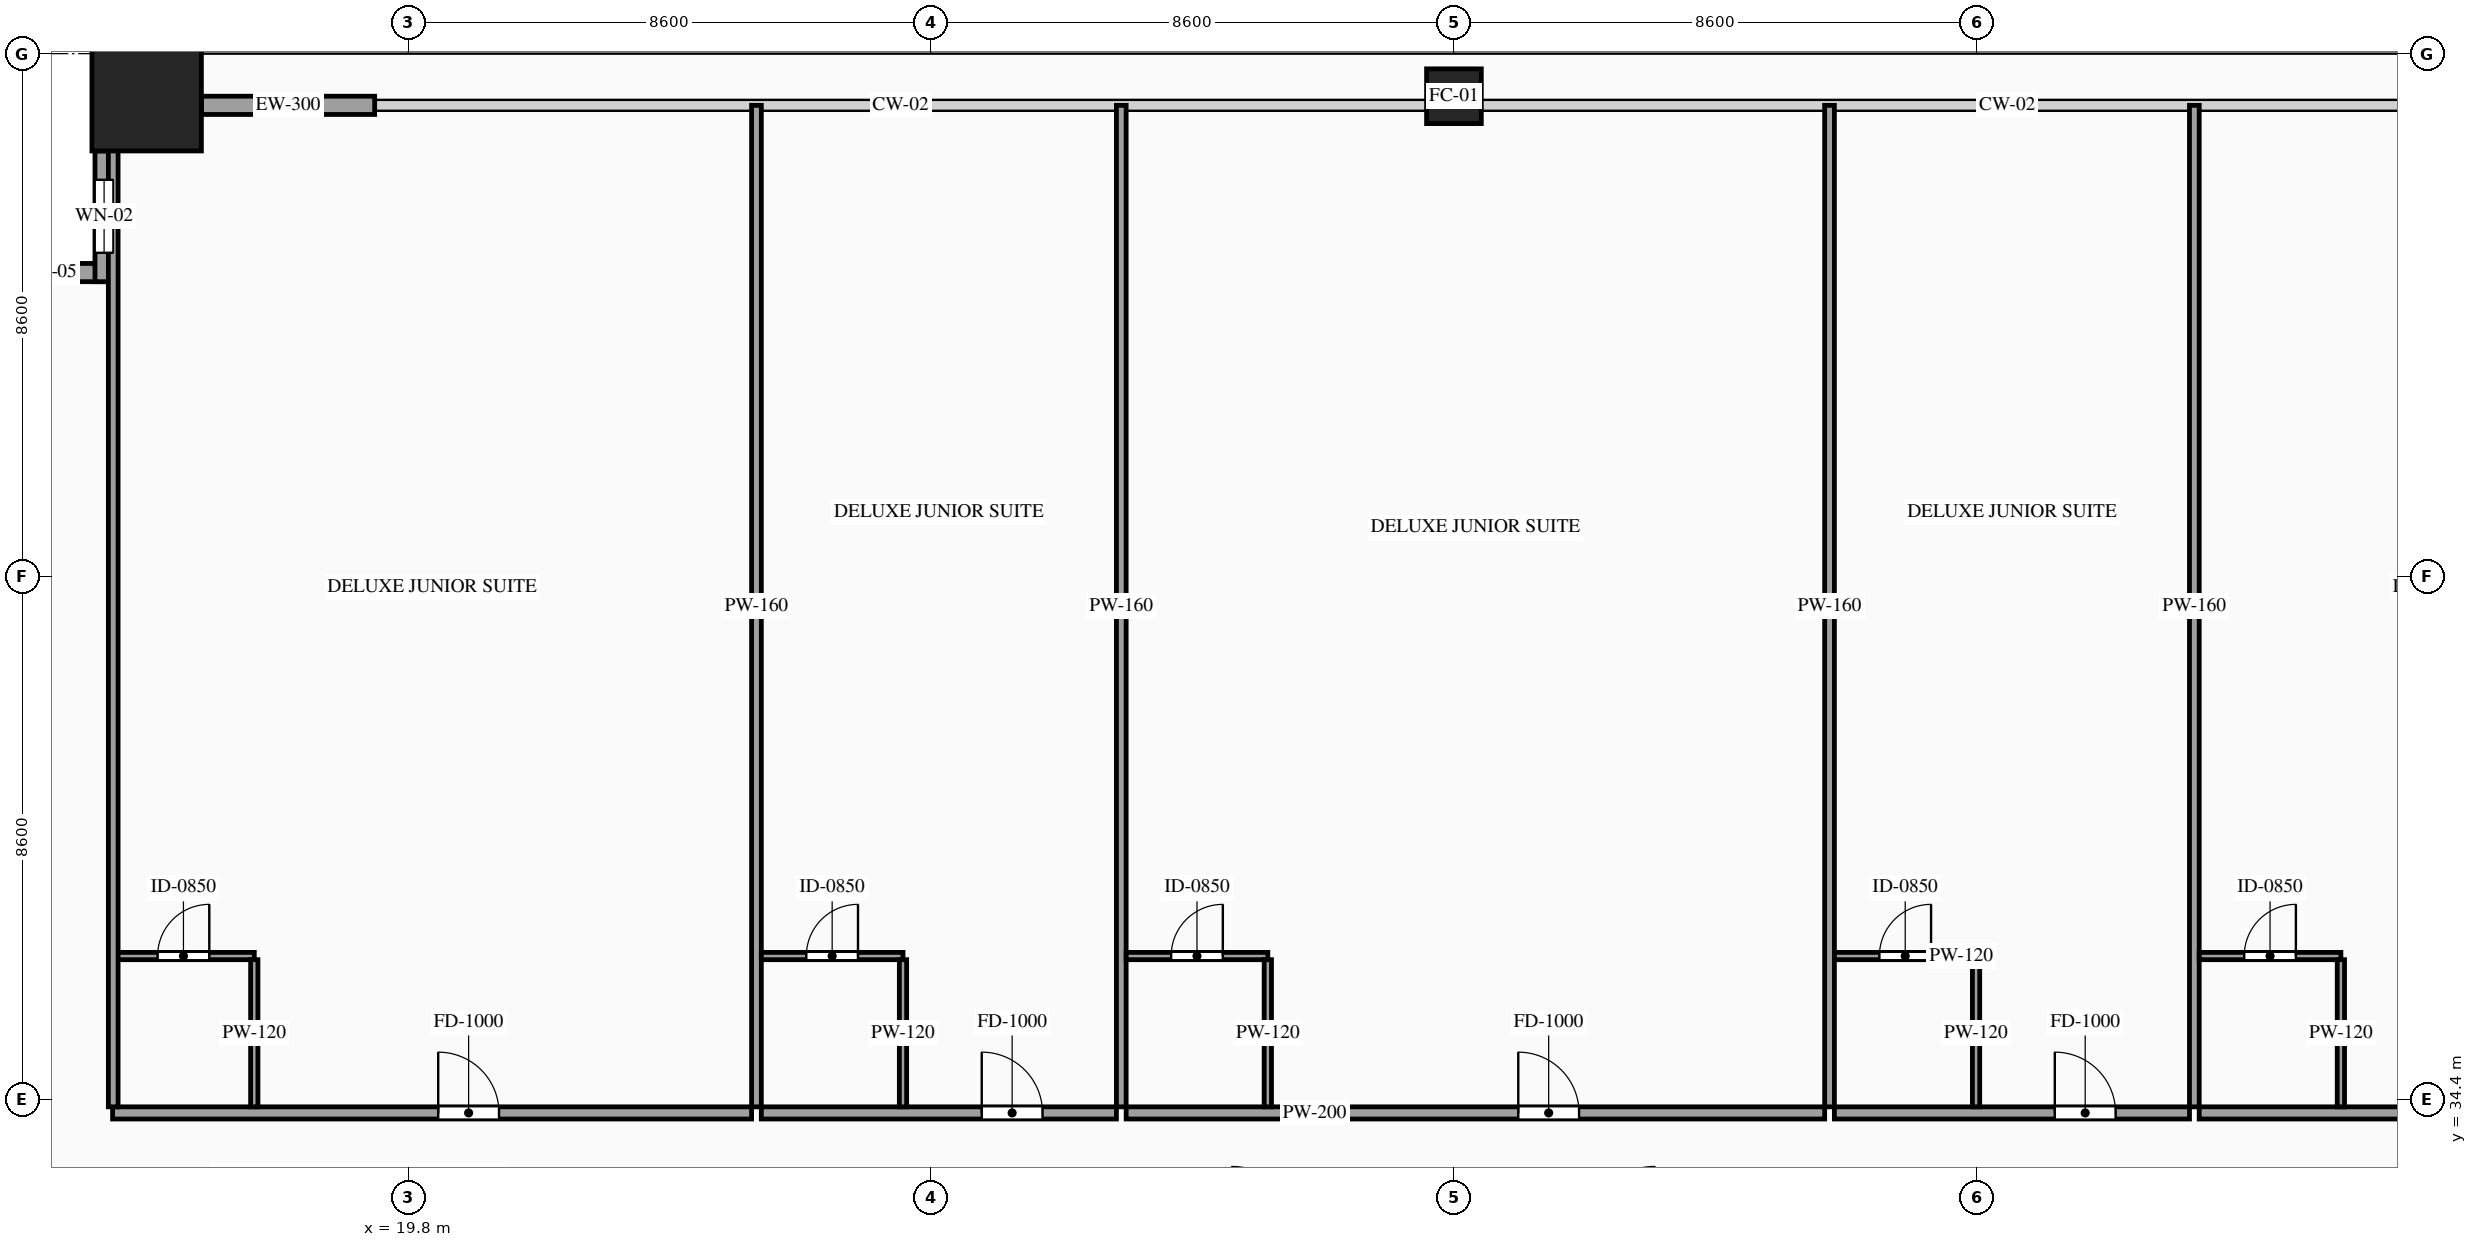
"""IFC4 building model, lengths in metres.
Left out: names, types, materials, properties, quantities, classifications, styles, units other than length and angle.
Written with IfcOpenShell. Run it as: python <this file> out.ifc"""

import sys

from ifc_helpers import new_model, si_unit, direction, frame, frame_2d, origin, origin_2d, place, context, subcontext, project, spatial, rectangle, hollow_rectangle, extrude, source, transform, mapped, element, fill, save


model = new_model("IFC4")
c1 = context("Model", 3, precision=1e-05, world=origin(), true_north=direction((0.0, 1.0)))
c2 = subcontext(c1, "Body", "Model", "MODEL_VIEW")
j1 = project(units=[si_unit("LENGTHUNIT", "METRE"), si_unit("PLANEANGLEUNIT", "RADIAN")], contexts=[c1])
p1 = place(None, origin())
s1 = spatial("IfcSite", under=j1, at=p1, CompositionType="ELEMENT")
p2 = place(p1, origin())
s2 = spatial("IfcBuilding", under=s1, at=p2, CompositionType="ELEMENT")
p3 = place(p2, frame((0.0, 0.0, 82.0)))
s3 = spatial("IfcBuildingStorey", under=s2, at=p3, CompositionType="ELEMENT", Elevation=82.0)
m1 = source(origin(), c2, "Body", "SweptSolid", [
    extrude(hollow_rectangle(XDim=1.8, YDim=1.8, WallThickness=0.08, at=origin_2d()), origin(), (0.0, 0.0, 1.0), 3.32),
])
p4 = place(p3, frame((15.5, 50.9, 0.0), z_axis=(0.0, 0.0, 1.0), x_axis=(1.0, 0.0, 0.0)))
e1 = element("IfcColumn", 1, at=p4, inside=s3, PredefinedType="COLUMN", context=c2, shape_type="MappedRepresentation", body=[
    mapped(m1, transform((0.0, 0.0, 0.0), scale=1.0)),
])
m2 = source(origin(), c2, "Body", "SweptSolid", [
    extrude(hollow_rectangle(XDim=0.9, YDim=0.9, WallThickness=0.042, at=origin_2d()), origin(), (0.0, 0.0, 1.0), 3.32),
])
p5 = place(p3, frame((37.0, 50.9, 0.0), z_axis=(0.0, 0.0, 1.0), x_axis=(1.0, 0.0, 0.0)))
e2 = element("IfcColumn", 2, at=p5, inside=s3, PredefinedType="COLUMN", context=c2, shape_type="MappedRepresentation", body=[
    mapped(m2, transform((0.0, 0.0, 0.0), scale=1.0)),
])
p6 = place(p3, frame((14.95, 48.0, 0.0), z_axis=(0.0, 0.0, 1.0), x_axis=(-1.0, 0.0, 0.0)))
e3 = element("IfcWall", 3, at=p6, inside=s3, PredefinedType="SOLIDWALL", context=c2, shape_type="SweptSolid", body=[
    extrude(rectangle(XDim=2.15, YDim=0.3, at=frame_2d((1.075, 0.0))), origin(), (0.0, 0.0, 1.0), 3.32),
])
p7 = place(p6, frame((0.625, 0.0, 0.85)))
e4 = element("IfcOpeningElement", 4, at=p7, cuts=e3, PredefinedType="OPENING", context=c2, shape_type="SweptSolid", body=[
    extrude(rectangle(XDim=0.9, YDim=1.5, at=frame_2d((0.45, 0.75))), frame((0.0, 0.165, 0.0), z_axis=(0.0, -1.0, 0.0), x_axis=(1.0, 0.0, 0.0)), (0.0, 0.0, 1.0), 0.33),
])
p8 = place(p3, frame((14.8, 50.0, 0.0), z_axis=(0.0, 0.0, 1.0), x_axis=(0.0, -1.0, 0.0)))
e5 = element("IfcWall", 5, at=p8, inside=s3, PredefinedType="SOLIDWALL", context=c2, shape_type="SweptSolid", body=[
    extrude(rectangle(XDim=2.15, YDim=0.3, at=frame_2d((1.075, 0.0))), origin(), (0.0, 0.0, 1.0), 3.32),
])
p9 = place(p8, frame((0.475, 0.0, 0.85)))
e6 = element("IfcOpeningElement", 6, at=p9, cuts=e5, PredefinedType="OPENING", context=c2, shape_type="SweptSolid", body=[
    extrude(rectangle(XDim=1.2, YDim=2.1, at=frame_2d((0.6, 1.05))), frame((0.0, 0.165, 0.0), z_axis=(0.0, -1.0, 0.0), x_axis=(1.0, 0.0, 0.0)), (0.0, 0.0, 1.0), 0.33),
])
m3 = source(origin(), c2, "Body", "SweptSolid", [
    extrude(rectangle(XDim=2.85, YDim=0.3, at=frame_2d((1.425, 0.0))), origin(), (0.0, 0.0, 1.0), 2.715),
])
p10 = place(p3, frame((16.4, 50.75, 0.0), z_axis=(0.0, 0.0, 1.0), x_axis=(1.0, 0.0, 0.0)))
e7 = element("IfcWall", 7, at=p10, inside=s3, PredefinedType="SOLIDWALL", context=c2, shape_type="MappedRepresentation", body=[
    mapped(m3, transform((0.0, 0.0, 0.0), scale=1.0)),
])
p11 = place(p3, frame((14.94, 34.18, 0.0), z_axis=(0.0, 0.0, 1.0), x_axis=(1.0, 0.0, 0.0)))
e8 = element("IfcWall", 8, at=p11, inside=s3, PredefinedType="PARTITIONING", context=c2, shape_type="SweptSolid", body=[
    extrude(rectangle(XDim=10.509, YDim=0.2, at=frame_2d((5.254, 0.0))), origin(), (0.0, 0.0, 1.0), 3.32),
])
p12 = place(p11, frame((5.355, 0.0, 0.0)))
e9 = element("IfcOpeningElement", 9, at=p12, cuts=e8, PredefinedType="OPENING", context=c2, shape_type="SweptSolid", body=[
    extrude(rectangle(XDim=1.0, YDim=2.2, at=frame_2d((0.5, 1.1))), frame((0.0, 0.115, 0.0), z_axis=(0.0, -1.0, 0.0), x_axis=(1.0, 0.0, 0.0)), (0.0, 0.0, 1.0), 0.23),
])
m4 = source(origin(), c2, "Body", "SweptSolid", [
    extrude(rectangle(XDim=16.47, YDim=0.16, at=frame_2d((8.235, 0.0))), origin(), (0.0, 0.0, 1.0), 3.32),
])
p13 = place(p3, frame((25.529, 34.28, 0.0), z_axis=(0.0, 0.0, 1.0), x_axis=(0.0, 1.0, 0.0)))
e10 = element("IfcWall", 10, at=p13, inside=s3, PredefinedType="PARTITIONING", context=c2, shape_type="MappedRepresentation", body=[
    mapped(m4, transform((0.0, 0.0, 0.0), scale=1.0)),
])
p14 = place(p3, frame((14.94, 36.76, 0.0), z_axis=(0.0, 0.0, 1.0), x_axis=(1.0, 0.0, 0.0)))
e11 = element("IfcWall", 11, at=p14, inside=s3, PredefinedType="PARTITIONING", context=c2, shape_type="SweptSolid", body=[
    extrude(rectangle(XDim=2.33, YDim=0.12, at=frame_2d((1.165, 0.0))), origin(), (0.0, 0.0, 1.0), 3.32),
])
p15 = place(p14, frame((0.74, 0.0, 0.0)))
e12 = element("IfcOpeningElement", 12, at=p15, cuts=e11, PredefinedType="OPENING", context=c2, shape_type="SweptSolid", body=[
    extrude(rectangle(XDim=0.85, YDim=2.1, at=frame_2d((0.425, 1.05))), frame((0.0, 0.075, 0.0), z_axis=(0.0, -1.0, 0.0), x_axis=(1.0, 0.0, 0.0)), (0.0, 0.0, 1.0), 0.15),
])
m5 = source(origin(), c2, "Body", "SweptSolid", [
    extrude(rectangle(XDim=2.42, YDim=0.12, at=frame_2d((1.21, 0.0))), origin(), (0.0, 0.0, 1.0), 3.32),
])
p16 = place(p3, frame((17.27, 34.28, 0.0), z_axis=(0.0, 0.0, 1.0), x_axis=(0.0, 1.0, 0.0)))
e13 = element("IfcWall", 13, at=p16, inside=s3, PredefinedType="PARTITIONING", context=c2, shape_type="MappedRepresentation", body=[
    mapped(m5, transform((0.0, 0.0, 0.0), scale=1.0)),
])
p17 = place(p3, frame((25.609, 34.18, 0.0), z_axis=(0.0, 0.0, 1.0), x_axis=(1.0, 0.0, 0.0)))
e14 = element("IfcWall", 14, at=p17, inside=s3, PredefinedType="PARTITIONING", context=c2, shape_type="SweptSolid", body=[
    extrude(rectangle(XDim=5.84, YDim=0.2, at=frame_2d((2.92, 0.0))), origin(), (0.0, 0.0, 1.0), 3.32),
])
p18 = place(p17, frame((3.625, 0.0, 0.0)))
e15 = element("IfcOpeningElement", 15, at=p18, cuts=e14, PredefinedType="OPENING", context=c2, shape_type="SweptSolid", body=[
    extrude(rectangle(XDim=1.0, YDim=2.2, at=frame_2d((0.5, 1.1))), frame((0.0, 0.115, 0.0), z_axis=(0.0, -1.0, 0.0), x_axis=(1.0, 0.0, 0.0)), (0.0, 0.0, 1.0), 0.23),
])
p19 = place(p3, frame((31.529, 34.28, 0.0), z_axis=(0.0, 0.0, 1.0), x_axis=(0.0, 1.0, 0.0)))
e16 = element("IfcWall", 16, at=p19, inside=s3, PredefinedType="PARTITIONING", context=c2, shape_type="MappedRepresentation", body=[
    mapped(m4, transform((0.0, 0.0, 0.0), scale=1.0)),
])
p20 = place(p3, frame((25.609, 36.76, 0.0), z_axis=(0.0, 0.0, 1.0), x_axis=(1.0, 0.0, 0.0)))
e17 = element("IfcWall", 17, at=p20, inside=s3, PredefinedType="PARTITIONING", context=c2, shape_type="SweptSolid", body=[
    extrude(rectangle(XDim=2.33, YDim=0.12, at=frame_2d((1.165, 0.0))), origin(), (0.0, 0.0, 1.0), 3.32),
])
p21 = place(p20, frame((0.74, 0.0, 0.0)))
e18 = element("IfcOpeningElement", 18, at=p21, cuts=e17, PredefinedType="OPENING", context=c2, shape_type="SweptSolid", body=[
    extrude(rectangle(XDim=0.85, YDim=2.1, at=frame_2d((0.425, 1.05))), frame((0.0, 0.075, 0.0), z_axis=(0.0, -1.0, 0.0), x_axis=(1.0, 0.0, 0.0)), (0.0, 0.0, 1.0), 0.15),
])
p22 = place(p3, frame((27.939, 34.28, 0.0), z_axis=(0.0, 0.0, 1.0), x_axis=(0.0, 1.0, 0.0)))
e19 = element("IfcWall", 19, at=p22, inside=s3, PredefinedType="PARTITIONING", context=c2, shape_type="MappedRepresentation", body=[
    mapped(m5, transform((0.0, 0.0, 0.0), scale=1.0)),
])
p23 = place(p3, frame((31.609, 34.18, 0.0), z_axis=(0.0, 0.0, 1.0), x_axis=(1.0, 0.0, 0.0)))
e20 = element("IfcWall", 20, at=p23, inside=s3, PredefinedType="PARTITIONING", context=c2, shape_type="SweptSolid", body=[
    extrude(rectangle(XDim=11.488, YDim=0.2, at=frame_2d((5.744, 0.0))), origin(), (0.0, 0.0, 1.0), 3.32),
])
p24 = place(p23, frame((6.449, 0.0, 0.0)))
e21 = element("IfcOpeningElement", 21, at=p24, cuts=e20, PredefinedType="OPENING", context=c2, shape_type="SweptSolid", body=[
    extrude(rectangle(XDim=1.0, YDim=2.2, at=frame_2d((0.5, 1.1))), frame((0.0, 0.115, 0.0), z_axis=(0.0, -1.0, 0.0), x_axis=(1.0, 0.0, 0.0)), (0.0, 0.0, 1.0), 0.23),
])
p25 = place(p3, frame((43.177, 34.28, 0.0), z_axis=(0.0, 0.0, 1.0), x_axis=(0.0, 1.0, 0.0)))
e22 = element("IfcWall", 22, at=p25, inside=s3, PredefinedType="PARTITIONING", context=c2, shape_type="MappedRepresentation", body=[
    mapped(m4, transform((0.0, 0.0, 0.0), scale=1.0)),
])
p26 = place(p3, frame((31.609, 36.76, 0.0), z_axis=(0.0, 0.0, 1.0), x_axis=(1.0, 0.0, 0.0)))
e23 = element("IfcWall", 23, at=p26, inside=s3, PredefinedType="PARTITIONING", context=c2, shape_type="SweptSolid", body=[
    extrude(rectangle(XDim=2.33, YDim=0.12, at=frame_2d((1.165, 0.0))), origin(), (0.0, 0.0, 1.0), 3.32),
])
p27 = place(p26, frame((0.74, 0.0, 0.0)))
e24 = element("IfcOpeningElement", 24, at=p27, cuts=e23, PredefinedType="OPENING", context=c2, shape_type="SweptSolid", body=[
    extrude(rectangle(XDim=0.85, YDim=2.1, at=frame_2d((0.425, 1.05))), frame((0.0, 0.075, 0.0), z_axis=(0.0, -1.0, 0.0), x_axis=(1.0, 0.0, 0.0)), (0.0, 0.0, 1.0), 0.15),
])
p28 = place(p3, frame((33.939, 34.28, 0.0), z_axis=(0.0, 0.0, 1.0), x_axis=(0.0, 1.0, 0.0)))
e25 = element("IfcWall", 25, at=p28, inside=s3, PredefinedType="PARTITIONING", context=c2, shape_type="MappedRepresentation", body=[
    mapped(m5, transform((0.0, 0.0, 0.0), scale=1.0)),
])
p29 = place(p3, frame((43.257, 34.18, 0.0), z_axis=(0.0, 0.0, 1.0), x_axis=(1.0, 0.0, 0.0)))
e26 = element("IfcWall", 26, at=p29, inside=s3, PredefinedType="PARTITIONING", context=c2, shape_type="SweptSolid", body=[
    extrude(rectangle(XDim=5.84, YDim=0.2, at=frame_2d((2.92, 0.0))), origin(), (0.0, 0.0, 1.0), 3.32),
])
p30 = place(p29, frame((3.625, 0.0, 0.0)))
e27 = element("IfcOpeningElement", 27, at=p30, cuts=e26, PredefinedType="OPENING", context=c2, shape_type="SweptSolid", body=[
    extrude(rectangle(XDim=1.0, YDim=2.2, at=frame_2d((0.5, 1.1))), frame((0.0, 0.115, 0.0), z_axis=(0.0, -1.0, 0.0), x_axis=(1.0, 0.0, 0.0)), (0.0, 0.0, 1.0), 0.23),
])
p31 = place(p3, frame((49.177, 34.28, 0.0), z_axis=(0.0, 0.0, 1.0), x_axis=(0.0, 1.0, 0.0)))
e28 = element("IfcWall", 28, at=p31, inside=s3, PredefinedType="PARTITIONING", context=c2, shape_type="MappedRepresentation", body=[
    mapped(m4, transform((0.0, 0.0, 0.0), scale=1.0)),
])
p32 = place(p3, frame((43.257, 36.76, 0.0), z_axis=(0.0, 0.0, 1.0), x_axis=(1.0, 0.0, 0.0)))
e29 = element("IfcWall", 29, at=p32, inside=s3, PredefinedType="PARTITIONING", context=c2, shape_type="SweptSolid", body=[
    extrude(rectangle(XDim=2.33, YDim=0.12, at=frame_2d((1.165, 0.0))), origin(), (0.0, 0.0, 1.0), 3.32),
])
p33 = place(p32, frame((0.74, 0.0, 0.0)))
e30 = element("IfcOpeningElement", 30, at=p33, cuts=e29, PredefinedType="OPENING", context=c2, shape_type="SweptSolid", body=[
    extrude(rectangle(XDim=0.85, YDim=2.1, at=frame_2d((0.425, 1.05))), frame((0.0, 0.075, 0.0), z_axis=(0.0, -1.0, 0.0), x_axis=(1.0, 0.0, 0.0)), (0.0, 0.0, 1.0), 0.15),
])
p34 = place(p3, frame((45.587, 34.28, 0.0), z_axis=(0.0, 0.0, 1.0), x_axis=(0.0, 1.0, 0.0)))
e31 = element("IfcWall", 31, at=p34, inside=s3, PredefinedType="PARTITIONING", context=c2, shape_type="MappedRepresentation", body=[
    mapped(m5, transform((0.0, 0.0, 0.0), scale=1.0)),
])
p35 = place(p3, frame((49.257, 34.18, 0.0), z_axis=(0.0, 0.0, 1.0), x_axis=(1.0, 0.0, 0.0)))
e32 = element("IfcWall", 32, at=p35, inside=s3, PredefinedType="PARTITIONING", context=c2, shape_type="SweptSolid", body=[
    extrude(rectangle(XDim=9.803, YDim=0.2, at=frame_2d((4.901, 0.0))), origin(), (0.0, 0.0, 1.0), 3.32),
])
p36 = place(p35, frame((5.607, 0.0, 0.0)))
e33 = element("IfcOpeningElement", 33, at=p36, cuts=e32, PredefinedType="OPENING", context=c2, shape_type="SweptSolid", body=[
    extrude(rectangle(XDim=1.0, YDim=2.2, at=frame_2d((0.5, 1.1))), frame((0.0, 0.115, 0.0), z_axis=(0.0, -1.0, 0.0), x_axis=(1.0, 0.0, 0.0)), (0.0, 0.0, 1.0), 0.23),
])
m6 = source(origin(), c2, "Body", "SweptSolid", [
    extrude(rectangle(XDim=16.32, YDim=0.16, at=frame_2d((8.16, 0.0))), origin(), (0.0, 0.0, 1.0), 3.32),
])
p37 = place(p3, frame((14.95, 34.28, 0.0), z_axis=(0.0, 0.0, 1.0), x_axis=(0.0, 1.0, 0.0)))
e34 = element("IfcWall", 34, at=p37, inside=s3, PredefinedType="PARTITIONING", context=c2, shape_type="MappedRepresentation", body=[
    mapped(m6, transform((0.0, 0.0, 0.0), scale=1.0)),
])
p38 = place(p3, frame((49.257, 36.76, 0.0), z_axis=(0.0, 0.0, 1.0), x_axis=(1.0, 0.0, 0.0)))
e35 = element("IfcWall", 35, at=p38, inside=s3, PredefinedType="PARTITIONING", context=c2, shape_type="SweptSolid", body=[
    extrude(rectangle(XDim=2.33, YDim=0.12, at=frame_2d((1.165, 0.0))), origin(), (0.0, 0.0, 1.0), 3.32),
])
p39 = place(p38, frame((0.74, 0.0, 0.0)))
e36 = element("IfcOpeningElement", 36, at=p39, cuts=e35, PredefinedType="OPENING", context=c2, shape_type="SweptSolid", body=[
    extrude(rectangle(XDim=0.85, YDim=2.1, at=frame_2d((0.425, 1.05))), frame((0.0, 0.075, 0.0), z_axis=(0.0, -1.0, 0.0), x_axis=(1.0, 0.0, 0.0)), (0.0, 0.0, 1.0), 0.15),
])
p40 = place(p3, frame((51.587, 34.28, 0.0), z_axis=(0.0, 0.0, 1.0), x_axis=(0.0, 1.0, 0.0)))
e37 = element("IfcWall", 37, at=p40, inside=s3, PredefinedType="PARTITIONING", context=c2, shape_type="MappedRepresentation", body=[
    mapped(m5, transform((0.0, 0.0, 0.0), scale=1.0)),
])
m7 = source(origin(), c2, "Body", "SweptSolid", [
    extrude(rectangle(XDim=0.9, YDim=1.5, at=frame_2d((0.45, 0.75))), frame((0.0, 0.03, 0.0), z_axis=(0.0, -1.0, 0.0), x_axis=(1.0, 0.0, 0.0)), (0.0, 0.0, 1.0), 0.06),
])
p41 = place(p7, origin())
e38 = element("IfcWindow", 38, at=p41, inside=s3, PartitioningType="SINGLE_PANEL", PredefinedType="WINDOW", context=c2, shape_type="MappedRepresentation", body=[
    mapped(m7, transform((0.0, 0.0, 0.0), scale=1.0)),
])
fill(e4, e38)
m8 = source(origin(), c2, "Body", "SweptSolid", [
    extrude(rectangle(XDim=1.2, YDim=2.1, at=frame_2d((0.6, 1.05))), frame((0.0, 0.03, 0.0), z_axis=(0.0, -1.0, 0.0), x_axis=(1.0, 0.0, 0.0)), (0.0, 0.0, 1.0), 0.06),
])
p42 = place(p9, origin())
e39 = element("IfcWindow", 39, at=p42, inside=s3, PartitioningType="SINGLE_PANEL", PredefinedType="WINDOW", context=c2, shape_type="MappedRepresentation", body=[
    mapped(m8, transform((0.0, 0.0, 0.0), scale=1.0)),
])
fill(e6, e39)
m9 = source(origin(), c2, "Body", "SweptSolid", [
    extrude(rectangle(XDim=1.0, YDim=2.2, at=frame_2d((0.5, 1.1))), frame((0.0, 0.025, 0.0), z_axis=(0.0, -1.0, 0.0), x_axis=(1.0, 0.0, 0.0)), (0.0, 0.0, 1.0), 0.05),
])
p43 = place(p12, origin())
e40 = element("IfcDoor", 40, at=p43, inside=s3, OperationType="SINGLE_SWING_LEFT", PredefinedType="DOOR", context=c2, shape_type="MappedRepresentation", body=[
    mapped(m9, transform((0.0, 0.0, 0.0), scale=1.0)),
])
fill(e9, e40)
m10 = source(origin(), c2, "Body", "SweptSolid", [
    extrude(rectangle(XDim=0.85, YDim=2.1, at=frame_2d((0.425, 1.05))), frame((0.0, 0.025, 0.0), z_axis=(0.0, -1.0, 0.0), x_axis=(1.0, 0.0, 0.0)), (0.0, 0.0, 1.0), 0.05),
])
p44 = place(p15, origin())
e41 = element("IfcDoor", 41, at=p44, inside=s3, OperationType="SINGLE_SWING_RIGHT", PredefinedType="DOOR", context=c2, shape_type="MappedRepresentation", body=[
    mapped(m10, transform((0.0, 0.0, 0.0), scale=1.0)),
])
fill(e12, e41)
p45 = place(p18, origin())
e42 = element("IfcDoor", 42, at=p45, inside=s3, OperationType="SINGLE_SWING_LEFT", PredefinedType="DOOR", context=c2, shape_type="MappedRepresentation", body=[
    mapped(m9, transform((0.0, 0.0, 0.0), scale=1.0)),
])
fill(e15, e42)
p46 = place(p21, origin())
e43 = element("IfcDoor", 43, at=p46, inside=s3, OperationType="SINGLE_SWING_RIGHT", PredefinedType="DOOR", context=c2, shape_type="MappedRepresentation", body=[
    mapped(m10, transform((0.0, 0.0, 0.0), scale=1.0)),
])
fill(e18, e43)
p47 = place(p24, origin())
e44 = element("IfcDoor", 44, at=p47, inside=s3, OperationType="SINGLE_SWING_LEFT", PredefinedType="DOOR", context=c2, shape_type="MappedRepresentation", body=[
    mapped(m9, transform((0.0, 0.0, 0.0), scale=1.0)),
])
fill(e21, e44)
p48 = place(p27, origin())
e45 = element("IfcDoor", 45, at=p48, inside=s3, OperationType="SINGLE_SWING_RIGHT", PredefinedType="DOOR", context=c2, shape_type="MappedRepresentation", body=[
    mapped(m10, transform((0.0, 0.0, 0.0), scale=1.0)),
])
fill(e24, e45)
p49 = place(p30, origin())
e46 = element("IfcDoor", 46, at=p49, inside=s3, OperationType="SINGLE_SWING_LEFT", PredefinedType="DOOR", context=c2, shape_type="MappedRepresentation", body=[
    mapped(m9, transform((0.0, 0.0, 0.0), scale=1.0)),
])
fill(e27, e46)
p50 = place(p33, origin())
e47 = element("IfcDoor", 47, at=p50, inside=s3, OperationType="SINGLE_SWING_RIGHT", PredefinedType="DOOR", context=c2, shape_type="MappedRepresentation", body=[
    mapped(m10, transform((0.0, 0.0, 0.0), scale=1.0)),
])
fill(e30, e47)
p51 = place(p39, origin())
e48 = element("IfcDoor", 48, at=p51, inside=s3, OperationType="SINGLE_SWING_RIGHT", PredefinedType="DOOR", context=c2, shape_type="MappedRepresentation", body=[
    mapped(m10, transform((0.0, 0.0, 0.0), scale=1.0)),
])
fill(e36, e48)
save(model, sys.argv[1])
